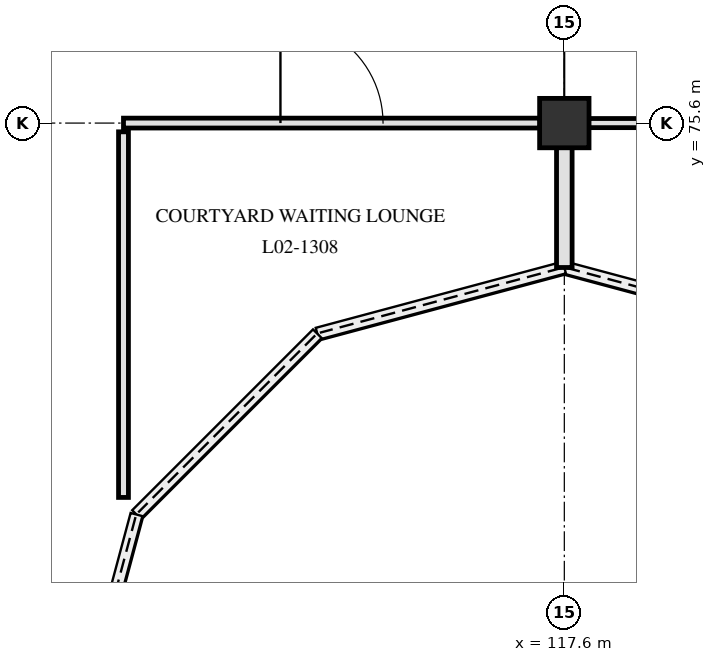
"""IFC4 building model, lengths in metres.
Left out: names, types, materials, properties, quantities, classifications, styles, units other than length and angle.
Written with IfcOpenShell. Run it as: python <this file> out.ifc"""

import sys

from ifc_helpers import new_model, si_unit, direction, frame, frame_2d, origin, origin_2d, place, context, subcontext, project, spatial, rectangle, circle, extrude, element, fill, save


model = new_model("IFC4")
c1 = context("Model", 3, precision=1e-05, world=origin(), true_north=direction((0.0, 1.0)))
c2 = subcontext(c1, "Body", "Model", "MODEL_VIEW")
j1 = project(units=[si_unit("LENGTHUNIT", "METRE"), si_unit("PLANEANGLEUNIT", "RADIAN")], contexts=[c1])
p1 = place(None, origin())
s1 = spatial("IfcSite", under=j1, at=p1, CompositionType="ELEMENT")
p2 = place(p1, origin())
s2 = spatial("IfcBuilding", under=s1, at=p2, CompositionType="ELEMENT")
p3 = place(p2, frame((0.0, 0.0, 9.3)))
s3 = spatial("IfcBuildingStorey", under=s2, at=p3, CompositionType="ELEMENT", Elevation=9.3)
p4 = place(p3, frame((117.6, 75.6, 0.0), z_axis=(0.0, 0.0, 1.0), x_axis=(1.0, 0.0, 0.0)))
e1 = element("IfcColumn", 1, at=p4, inside=s3, PredefinedType="COLUMN", context=c2, shape_type="SweptSolid", body=[
    extrude(circle(Radius=0.325, at=origin_2d()), origin(), (0.0, 0.0, 1.0), 5.1),
])
p5 = place(p3, frame((111.8, 75.6, 0.0), z_axis=(0.0, 0.0, 1.0), x_axis=(1.0, 0.0, 0.0)))
e2 = element("IfcWall", 2, at=p5, inside=s3, PredefinedType="PARTITIONING", context=c2, shape_type="SweptSolid", body=[
    extrude(rectangle(XDim=5.48, YDim=0.13, at=frame_2d((2.74, 0.0))), origin(), (0.0, 0.0, 1.0), 4.17),
])
p6 = place(p5, frame((2.065, 0.0, 0.0)))
e3 = element("IfcOpeningElement", 3, at=p6, cuts=e2, PredefinedType="OPENING", context=c2, shape_type="SweptSolid", body=[
    extrude(rectangle(XDim=1.35, YDim=2.2, at=frame_2d((0.675, 1.1))), frame((0.0, 0.075, 0.0), z_axis=(0.0, -1.0, 0.0), x_axis=(1.0, 0.0, 0.0)), (0.0, 0.0, 1.0), 0.15),
])
p7 = place(p3, frame((117.92, 75.6, 0.0), z_axis=(0.0, 0.0, 1.0), x_axis=(1.0, 0.0, 0.0)))
e4 = element("IfcWall", 4, at=p7, inside=s3, PredefinedType="PARTITIONING", context=c2, shape_type="SweptSolid", body=[
    extrude(rectangle(XDim=7.76, YDim=0.12, at=frame_2d((3.88, 0.0))), origin(), (0.0, 0.0, 1.0), 4.17),
])
p8 = place(p7, frame((3.14, 0.0, 0.0)))
e5 = element("IfcOpeningElement", 5, at=p8, cuts=e4, PredefinedType="OPENING", context=c2, shape_type="SweptSolid", body=[
    extrude(rectangle(XDim=1.48, YDim=2.22, at=frame_2d((0.74, 1.11))), frame((0.0, 0.07, 0.0), z_axis=(0.0, -1.0, 0.0), x_axis=(1.0, 0.0, 0.0)), (0.0, 0.0, 1.0), 0.14),
])
p9 = place(p3, frame((111.8, 70.675, 0.0), z_axis=(0.0, 0.0, 1.0), x_axis=(0.0, 1.0, 0.0)))
e6 = element("IfcWall", 6, at=p9, inside=s3, PredefinedType="PARTITIONING", context=c2, shape_type="SweptSolid", body=[
    extrude(rectangle(XDim=4.81, YDim=0.13, at=frame_2d((2.405, 0.0))), origin(), (0.0, 0.0, 1.0), 4.17),
])
p10 = place(p3, frame((117.6, 73.7, 0.0), z_axis=(0.0, 0.0, 1.0), x_axis=(0.0, 1.0, 0.0)))
e7 = element("IfcWall", 7, at=p10, inside=s3, PredefinedType="PARTITIONING", context=c2, shape_type="SweptSolid", body=[
    extrude(rectangle(XDim=1.58, YDim=0.205, at=frame_2d((0.79, 0.0))), origin(), (0.0, 0.0, 1.0), 4.77),
])
p11 = place(p6, origin())
e8 = element("IfcDoor", 8, at=p11, inside=s3, OperationType="SINGLE_SWING_LEFT", PredefinedType="DOOR", context=c2, shape_type="SweptSolid", body=[
    extrude(rectangle(XDim=1.35, YDim=2.2, at=frame_2d((0.675, 1.1))), frame((0.0, 0.025, 0.0), z_axis=(0.0, -1.0, 0.0), x_axis=(1.0, 0.0, 0.0)), (0.0, 0.0, 1.0), 0.05),
])
fill(e3, e8)
save(model, sys.argv[1])
